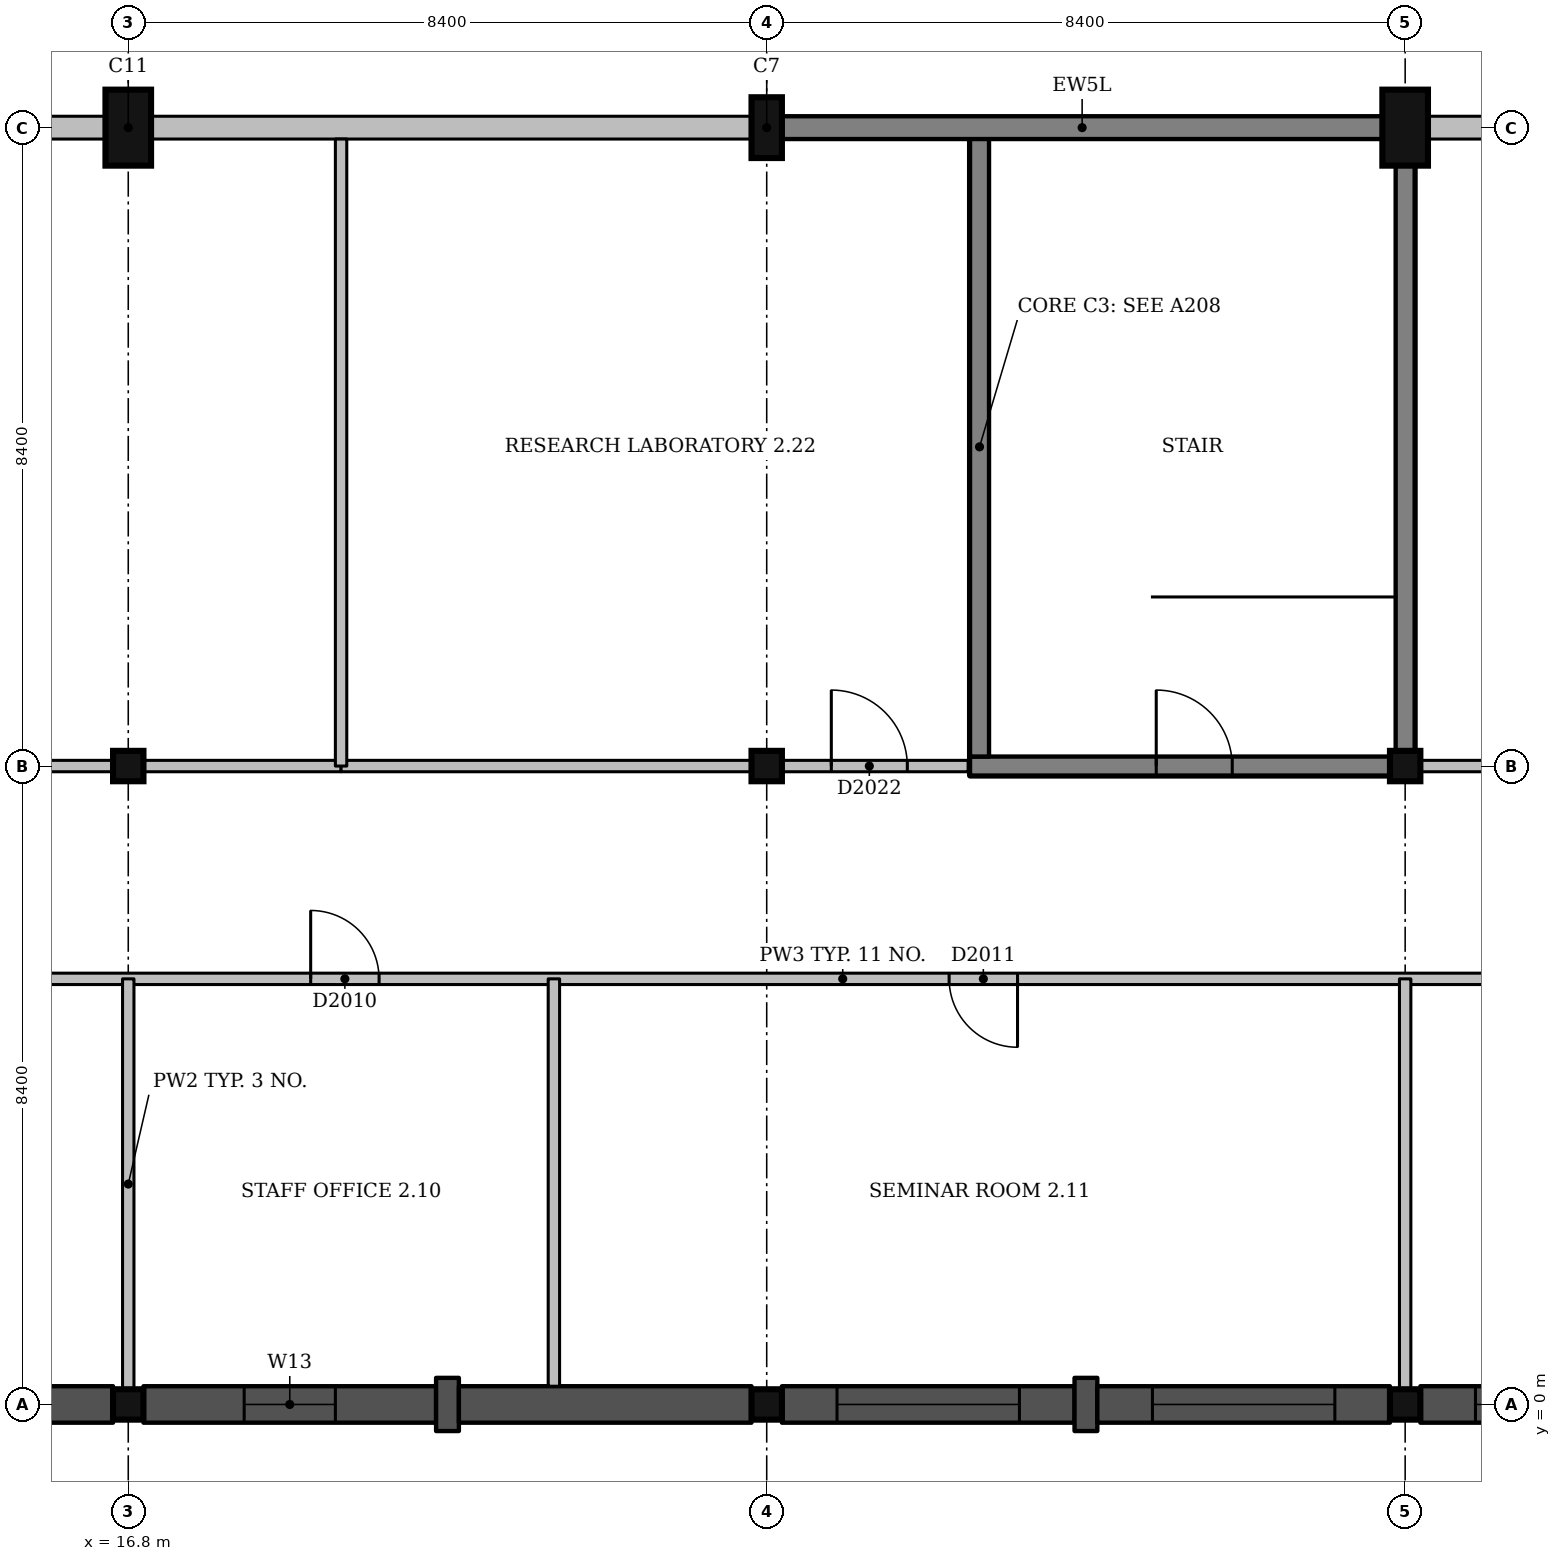
"""IFC4 building model, lengths in metres.
Left out: names, types, materials, properties, quantities, classifications, styles, units other than length and angle.
Written with IfcOpenShell. Run it as: python <this file> out.ifc"""

import sys

from ifc_helpers import new_model, si_unit, direction, frame, frame_2d, origin, origin_2d, place, context, subcontext, project, spatial, rectangle, extrude, element, fill, save


model = new_model("IFC4")
c1 = context("Model", 3, precision=1e-05, world=origin(), true_north=direction((0.0, 1.0)))
c2 = subcontext(c1, "Body", "Model", "MODEL_VIEW")
j1 = project(units=[si_unit("LENGTHUNIT", "METRE"), si_unit("PLANEANGLEUNIT", "RADIAN")], contexts=[c1])
p1 = place(None, origin())
s1 = spatial("IfcSite", under=j1, at=p1, CompositionType="ELEMENT")
p2 = place(p1, origin())
s2 = spatial("IfcBuilding", under=s1, at=p2, CompositionType="ELEMENT")
p3 = place(p2, frame((0.0, 0.0, 9.0)))
s3 = spatial("IfcBuildingStorey", under=s2, at=p3, CompositionType="ELEMENT", Elevation=9.0)
for number, where, z_axis, x_axis in (
    (1, (16.8, 0.0, 0.0), (0.0, 0.0, 1.0), (1.0, 0.0, 0.0)),
    (2, (16.8, 8.4, 0.0), (0.0, 0.0, 1.0), (1.0, 0.0, 0.0)),
):
    element("IfcColumn", number, at=place(p3, frame(where, z_axis=z_axis, x_axis=x_axis)), inside=s3, PredefinedType="COLUMN", context=c2, shape_type="SweptSolid", body=[
        extrude(rectangle(XDim=0.4, YDim=0.4, at=origin_2d()), origin(), (0.0, 0.0, 1.0), 4.5),
    ])
p4 = place(p3, frame((16.8, 16.8, 0.0), z_axis=(0.0, 0.0, 1.0), x_axis=(1.0, 0.0, 0.0)))
e3 = element("IfcColumn", 3, at=p4, inside=s3, PredefinedType="COLUMN", context=c2, shape_type="SweptSolid", body=[
    extrude(rectangle(XDim=0.6, YDim=1.0, at=origin_2d()), origin(), (0.0, 0.0, 1.0), 4.5),
])
for number, where, z_axis, x_axis in (
    (4, (25.2, 0.0, 0.0), (0.0, 0.0, 1.0), (1.0, 0.0, 0.0)),
    (5, (25.2, 8.4, 0.0), (0.0, 0.0, 1.0), (1.0, 0.0, 0.0)),
):
    element("IfcColumn", number, at=place(p3, frame(where, z_axis=z_axis, x_axis=x_axis)), inside=s3, PredefinedType="COLUMN", context=c2, shape_type="SweptSolid", body=[
        extrude(rectangle(XDim=0.4, YDim=0.4, at=origin_2d()), origin(), (0.0, 0.0, 1.0), 4.5),
    ])
p5 = place(p3, frame((25.2, 16.8, 0.0), z_axis=(0.0, 0.0, 1.0), x_axis=(1.0, 0.0, 0.0)))
e6 = element("IfcColumn", 6, at=p5, inside=s3, PredefinedType="COLUMN", context=c2, shape_type="SweptSolid", body=[
    extrude(rectangle(XDim=0.4, YDim=0.8, at=origin_2d()), origin(), (0.0, 0.0, 1.0), 4.5),
])
for number, where, z_axis, x_axis in (
    (7, (33.6, 0.0, 0.0), (0.0, 0.0, 1.0), (1.0, 0.0, 0.0)),
    (8, (33.6, 8.4, 0.0), (0.0, 0.0, 1.0), (1.0, 0.0, 0.0)),
):
    element("IfcColumn", number, at=place(p3, frame(where, z_axis=z_axis, x_axis=x_axis)), inside=s3, PredefinedType="COLUMN", context=c2, shape_type="SweptSolid", body=[
        extrude(rectangle(XDim=0.4, YDim=0.4, at=origin_2d()), origin(), (0.0, 0.0, 1.0), 4.5),
    ])
p6 = place(p3, frame((33.6, 16.8, 0.0), z_axis=(0.0, 0.0, 1.0), x_axis=(1.0, 0.0, 0.0)))
e9 = element("IfcColumn", 9, at=p6, inside=s3, PredefinedType="COLUMN", context=c2, shape_type="SweptSolid", body=[
    extrude(rectangle(XDim=0.6, YDim=1.0, at=origin_2d()), origin(), (0.0, 0.0, 1.0), 4.5),
])
p7 = place(p3, frame((27.875, 8.4, 0.0), z_axis=(0.0, 0.0, 1.0), x_axis=(1.0, 0.0, 0.0)))
e10 = element("IfcWall", 10, at=p7, inside=s3, PredefinedType="SHEAR", context=c2, shape_type="SweptSolid", body=[
    extrude(rectangle(XDim=5.525, YDim=0.25, at=frame_2d((2.762, 0.0))), origin(), (0.0, 0.0, 1.0), 4.2),
])
p8 = place(p7, frame((2.45, 0.0, 0.0)))
e11 = element("IfcOpeningElement", 11, at=p8, cuts=e10, PredefinedType="OPENING", context=c2, shape_type="SweptSolid", body=[
    extrude(rectangle(XDim=1.0, YDim=2.1, at=frame_2d((0.5, 1.05))), frame((0.0, 0.135, 0.0), z_axis=(0.0, -1.0, 0.0), x_axis=(1.0, 0.0, 0.0)), (0.0, 0.0, 1.0), 0.27),
])
p9 = place(p3, frame((28.0, 8.525, 0.0), z_axis=(0.0, 0.0, 1.0), x_axis=(0.0, 1.0, 0.0)))
e12 = element("IfcWall", 12, at=p9, inside=s3, PredefinedType="SHEAR", context=c2, shape_type="SweptSolid", body=[
    extrude(rectangle(XDim=8.15, YDim=0.25, at=frame_2d((4.075, 0.0))), origin(), (0.0, 0.0, 1.0), 4.2),
])
p10 = place(p3, frame((33.6, 8.6, 0.0), z_axis=(0.0, 0.0, 1.0), x_axis=(0.0, 1.0, 0.0)))
e13 = element("IfcWall", 13, at=p10, inside=s3, PredefinedType="SHEAR", context=c2, shape_type="SweptSolid", body=[
    extrude(rectangle(XDim=7.7, YDim=0.25, at=frame_2d((3.85, 0.0))), origin(), (0.0, 0.0, 1.0), 4.2),
])
for number, where, z_axis, x_axis in (
    (14, (41.8, 16.8, 0.0), (0.0, 0.0, 1.0), (-1.0, 0.0, 0.0)),
    (15, (33.3, 16.8, 0.0), (0.0, 0.0, 1.0), (-1.0, 0.0, 0.0)),
):
    element("IfcWall", number, at=place(p3, frame(where, z_axis=z_axis, x_axis=x_axis)), inside=s3, PredefinedType="SOLIDWALL", context=c2, shape_type="SweptSolid", body=[
        extrude(rectangle(XDim=7.9, YDim=0.3, at=frame_2d((3.95, 0.0))), origin(), (0.0, 0.0, 1.0), 3.6),
    ])
for number, where, z_axis, x_axis in (
    (16, (25.0, 16.8, 0.0), (0.0, 0.0, 1.0), (-1.0, 0.0, 0.0)),
    (17, (16.5, 16.8, 0.0), (0.0, 0.0, 1.0), (-1.0, 0.0, 0.0)),
):
    element("IfcWall", number, at=place(p3, frame(where, z_axis=z_axis, x_axis=x_axis)), inside=s3, PredefinedType="SOLIDWALL", context=c2, shape_type="SweptSolid", body=[
        extrude(rectangle(XDim=7.9, YDim=0.3, at=frame_2d((3.95, 0.0))), origin(), (0.0, 0.0, 1.0), 3.6),
    ])
p11 = place(p3, frame((12.75, 0.0, 0.0), z_axis=(0.0, 0.0, 1.0), x_axis=(1.0, 0.0, 0.0)))
e18 = element("IfcWall", 18, at=p11, inside=s3, PredefinedType="SOLIDWALL", context=c2, shape_type="SweptSolid", body=[
    extrude(rectangle(XDim=3.85, YDim=0.48, at=frame_2d((1.925, 0.0))), origin(), (0.0, 0.0, 1.0), 3.6),
])
p12 = place(p11, frame((1.325, 0.0, 0.9)))
e19 = element("IfcOpeningElement", 19, at=p12, cuts=e18, PredefinedType="OPENING", context=c2, shape_type="SweptSolid", body=[
    extrude(rectangle(XDim=1.2, YDim=2.1, at=frame_2d((0.6, 1.05))), frame((0.0, 0.25, 0.0), z_axis=(0.0, -1.0, 0.0), x_axis=(1.0, 0.0, 0.0)), (0.0, 0.0, 1.0), 0.5),
])
p13 = place(p3, frame((17.0, 0.0, 0.0), z_axis=(0.0, 0.0, 1.0), x_axis=(1.0, 0.0, 0.0)))
e20 = element("IfcWall", 20, at=p13, inside=s3, PredefinedType="SOLIDWALL", context=c2, shape_type="SweptSolid", body=[
    extrude(rectangle(XDim=3.85, YDim=0.48, at=frame_2d((1.925, 0.0))), origin(), (0.0, 0.0, 1.0), 3.6),
])
p14 = place(p13, frame((1.325, 0.0, 0.9)))
e21 = element("IfcOpeningElement", 21, at=p14, cuts=e20, PredefinedType="OPENING", context=c2, shape_type="SweptSolid", body=[
    extrude(rectangle(XDim=1.2, YDim=2.1, at=frame_2d((0.6, 1.05))), frame((0.0, 0.25, 0.0), z_axis=(0.0, -1.0, 0.0), x_axis=(1.0, 0.0, 0.0)), (0.0, 0.0, 1.0), 0.5),
])
p15 = place(p3, frame((20.85, 0.0, 0.0), z_axis=(0.0, 0.0, 1.0), x_axis=(1.0, 0.0, 0.0)))
e22 = element("IfcWall", 22, at=p15, inside=s3, PredefinedType="SOLIDWALL", context=c2, shape_type="SweptSolid", body=[
    extrude(rectangle(XDim=0.3, YDim=0.7, at=frame_2d((0.15, 0.0))), origin(), (0.0, 0.0, 1.0), 3.6),
])
p16 = place(p3, frame((21.15, 0.0, 0.0), z_axis=(0.0, 0.0, 1.0), x_axis=(1.0, 0.0, 0.0)))
e23 = element("IfcWall", 23, at=p16, inside=s3, PredefinedType="SOLIDWALL", context=c2, shape_type="SweptSolid", body=[
    extrude(rectangle(XDim=3.85, YDim=0.48, at=frame_2d((1.925, 0.0))), origin(), (0.0, 0.0, 1.0), 3.6),
])
p17 = place(p3, frame((25.4, 0.0, 0.0), z_axis=(0.0, 0.0, 1.0), x_axis=(1.0, 0.0, 0.0)))
e24 = element("IfcWall", 24, at=p17, inside=s3, PredefinedType="SOLIDWALL", context=c2, shape_type="SweptSolid", body=[
    extrude(rectangle(XDim=3.85, YDim=0.48, at=frame_2d((1.925, 0.0))), origin(), (0.0, 0.0, 1.0), 3.6),
])
p18 = place(p17, frame((0.725, 0.0, 2.4)))
e25 = element("IfcOpeningElement", 25, at=p18, cuts=e24, PredefinedType="OPENING", context=c2, shape_type="SweptSolid", body=[
    extrude(rectangle(XDim=2.4, YDim=0.6, at=frame_2d((1.2, 0.3))), frame((0.0, 0.25, 0.0), z_axis=(0.0, -1.0, 0.0), x_axis=(1.0, 0.0, 0.0)), (0.0, 0.0, 1.0), 0.5),
])
p19 = place(p3, frame((29.25, 0.0, 0.0), z_axis=(0.0, 0.0, 1.0), x_axis=(1.0, 0.0, 0.0)))
e26 = element("IfcWall", 26, at=p19, inside=s3, PredefinedType="SOLIDWALL", context=c2, shape_type="SweptSolid", body=[
    extrude(rectangle(XDim=0.3, YDim=0.7, at=frame_2d((0.15, 0.0))), origin(), (0.0, 0.0, 1.0), 3.6),
])
p20 = place(p3, frame((29.55, 0.0, 0.0), z_axis=(0.0, 0.0, 1.0), x_axis=(1.0, 0.0, 0.0)))
e27 = element("IfcWall", 27, at=p20, inside=s3, PredefinedType="SOLIDWALL", context=c2, shape_type="SweptSolid", body=[
    extrude(rectangle(XDim=3.85, YDim=0.48, at=frame_2d((1.925, 0.0))), origin(), (0.0, 0.0, 1.0), 3.6),
])
p21 = place(p20, frame((0.725, 0.0, 2.4)))
e28 = element("IfcOpeningElement", 28, at=p21, cuts=e27, PredefinedType="OPENING", context=c2, shape_type="SweptSolid", body=[
    extrude(rectangle(XDim=2.4, YDim=0.6, at=frame_2d((1.2, 0.3))), frame((0.0, 0.25, 0.0), z_axis=(0.0, -1.0, 0.0), x_axis=(1.0, 0.0, 0.0)), (0.0, 0.0, 1.0), 0.5),
])
p22 = place(p3, frame((33.8, 0.0, 0.0), z_axis=(0.0, 0.0, 1.0), x_axis=(1.0, 0.0, 0.0)))
e29 = element("IfcWall", 29, at=p22, inside=s3, PredefinedType="SOLIDWALL", context=c2, shape_type="SweptSolid", body=[
    extrude(rectangle(XDim=3.85, YDim=0.48, at=frame_2d((1.925, 0.0))), origin(), (0.0, 0.0, 1.0), 3.6),
])
p23 = place(p22, frame((0.725, 0.0, 2.4)))
e30 = element("IfcOpeningElement", 30, at=p23, cuts=e29, PredefinedType="OPENING", context=c2, shape_type="SweptSolid", body=[
    extrude(rectangle(XDim=2.4, YDim=0.6, at=frame_2d((1.2, 0.3))), frame((0.0, 0.25, 0.0), z_axis=(0.0, -1.0, 0.0), x_axis=(1.0, 0.0, 0.0)), (0.0, 0.0, 1.0), 0.5),
])
p24 = place(p3, frame((11.2, 5.6, 0.0), z_axis=(0.0, 0.0, 1.0), x_axis=(1.0, 0.0, 0.0)))
e31 = element("IfcWall", 31, at=p24, inside=s3, PredefinedType="PARTITIONING", context=c2, shape_type="SweptSolid", body=[
    extrude(rectangle(XDim=30.0, YDim=0.15, at=frame_2d((15.0, 0.0))), origin(), (0.0, 0.0, 1.0), 3.6),
])
p25 = place(p24, frame((2.4, 0.0, 0.0)))
e32 = element("IfcOpeningElement", 32, at=p25, cuts=e31, PredefinedType="OPENING", context=c2, shape_type="SweptSolid", body=[
    extrude(rectangle(XDim=0.9, YDim=2.1, at=frame_2d((0.45, 1.05))), frame((0.0, 0.085, 0.0), z_axis=(0.0, -1.0, 0.0), x_axis=(1.0, 0.0, 0.0)), (0.0, 0.0, 1.0), 0.17),
])
p26 = place(p24, frame((8.0, 0.0, 0.0)))
e33 = element("IfcOpeningElement", 33, at=p26, cuts=e31, PredefinedType="OPENING", context=c2, shape_type="SweptSolid", body=[
    extrude(rectangle(XDim=0.9, YDim=2.1, at=frame_2d((0.45, 1.05))), frame((0.0, 0.085, 0.0), z_axis=(0.0, -1.0, 0.0), x_axis=(1.0, 0.0, 0.0)), (0.0, 0.0, 1.0), 0.17),
])
p27 = place(p24, frame((16.4, 0.0, 0.0)))
e34 = element("IfcOpeningElement", 34, at=p27, cuts=e31, PredefinedType="OPENING", context=c2, shape_type="SweptSolid", body=[
    extrude(rectangle(XDim=0.9, YDim=2.1, at=frame_2d((0.45, 1.05))), frame((0.0, 0.085, 0.0), z_axis=(0.0, -1.0, 0.0), x_axis=(1.0, 0.0, 0.0)), (0.0, 0.0, 1.0), 0.17),
])
p28 = place(p3, frame((8.6, 8.4, 0.0), z_axis=(0.0, 0.0, 1.0), x_axis=(1.0, 0.0, 0.0)))
e35 = element("IfcWall", 35, at=p28, inside=s3, PredefinedType="PARTITIONING", context=c2, shape_type="SweptSolid", body=[
    extrude(rectangle(XDim=8.0, YDim=0.15, at=frame_2d((4.0, 0.0))), origin(), (0.0, 0.0, 1.0), 3.6),
])
p29 = place(p28, frame((3.45, 0.0, 0.0)))
e36 = element("IfcOpeningElement", 36, at=p29, cuts=e35, PredefinedType="OPENING", context=c2, shape_type="SweptSolid", body=[
    extrude(rectangle(XDim=0.9, YDim=2.1, at=frame_2d((0.45, 1.05))), frame((0.0, 0.085, 0.0), z_axis=(0.0, -1.0, 0.0), x_axis=(1.0, 0.0, 0.0)), (0.0, 0.0, 1.0), 0.17),
])
p30 = place(p3, frame((17.0, 8.4, 0.0), z_axis=(0.0, 0.0, 1.0), x_axis=(1.0, 0.0, 0.0)))
e37 = element("IfcWall", 37, at=p30, inside=s3, PredefinedType="PARTITIONING", context=c2, shape_type="SweptSolid", body=[
    extrude(rectangle(XDim=2.6, YDim=0.15, at=frame_2d((1.3, 0.0))), origin(), (0.0, 0.0, 1.0), 3.6),
])
p31 = place(p3, frame((33.8, 8.4, 0.0), z_axis=(0.0, 0.0, 1.0), x_axis=(1.0, 0.0, 0.0)))
e38 = element("IfcWall", 38, at=p31, inside=s3, PredefinedType="PARTITIONING", context=c2, shape_type="SweptSolid", body=[
    extrude(rectangle(XDim=8.0, YDim=0.15, at=frame_2d((4.0, 0.0))), origin(), (0.0, 0.0, 1.0), 3.6),
])
p32 = place(p31, frame((3.1, 0.0, 0.0)))
e39 = element("IfcOpeningElement", 39, at=p32, cuts=e38, PredefinedType="OPENING", context=c2, shape_type="SweptSolid", body=[
    extrude(rectangle(XDim=1.8, YDim=2.1, at=frame_2d((0.9, 1.05))), frame((0.0, 0.085, 0.0), z_axis=(0.0, -1.0, 0.0), x_axis=(1.0, 0.0, 0.0)), (0.0, 0.0, 1.0), 0.17),
])
p33 = place(p3, frame((19.6, 8.4, 0.0), z_axis=(0.0, 0.0, 1.0), x_axis=(1.0, 0.0, 0.0)))
e40 = element("IfcWall", 40, at=p33, inside=s3, PredefinedType="PARTITIONING", context=c2, shape_type="SweptSolid", body=[
    extrude(rectangle(XDim=5.4, YDim=0.15, at=frame_2d((2.7, 0.0))), origin(), (0.0, 0.0, 1.0), 3.6),
])
p34 = place(p3, frame((25.4, 8.4, 0.0), z_axis=(0.0, 0.0, 1.0), x_axis=(1.0, 0.0, 0.0)))
e41 = element("IfcWall", 41, at=p34, inside=s3, PredefinedType="PARTITIONING", context=c2, shape_type="SweptSolid", body=[
    extrude(rectangle(XDim=2.45, YDim=0.15, at=frame_2d((1.225, 0.0))), origin(), (0.0, 0.0, 1.0), 3.6),
])
p35 = place(p34, frame((0.65, 0.0, 0.0)))
e42 = element("IfcOpeningElement", 42, at=p35, cuts=e41, PredefinedType="OPENING", context=c2, shape_type="SweptSolid", body=[
    extrude(rectangle(XDim=1.0, YDim=2.1, at=frame_2d((0.5, 1.05))), frame((0.0, 0.085, 0.0), z_axis=(0.0, -1.0, 0.0), x_axis=(1.0, 0.0, 0.0)), (0.0, 0.0, 1.0), 0.17),
])
p36 = place(p3, frame((16.8, 0.2, 0.0), z_axis=(0.0, 0.0, 1.0), x_axis=(0.0, 1.0, 0.0)))
e43 = element("IfcWall", 43, at=p36, inside=s3, PredefinedType="PARTITIONING", context=c2, shape_type="SweptSolid", body=[
    extrude(rectangle(XDim=5.4, YDim=0.15, at=frame_2d((2.7, 0.0))), origin(), (0.0, 0.0, 1.0), 3.6),
])
p37 = place(p3, frame((19.6, 8.4, 0.0), z_axis=(0.0, 0.0, 1.0), x_axis=(0.0, 1.0, 0.0)))
e44 = element("IfcWall", 44, at=p37, inside=s3, PredefinedType="PARTITIONING", context=c2, shape_type="SweptSolid", body=[
    extrude(rectangle(XDim=8.25, YDim=0.15, at=frame_2d((4.125, 0.0))), origin(), (0.0, 0.0, 1.0), 3.6),
])
p38 = place(p3, frame((22.4, 0.24, 0.0), z_axis=(0.0, 0.0, 1.0), x_axis=(0.0, 1.0, 0.0)))
e45 = element("IfcWall", 45, at=p38, inside=s3, PredefinedType="PARTITIONING", context=c2, shape_type="SweptSolid", body=[
    extrude(rectangle(XDim=5.36, YDim=0.15, at=frame_2d((2.68, 0.0))), origin(), (0.0, 0.0, 1.0), 4.15),
])
p39 = place(p3, frame((33.6, 0.2, 0.0), z_axis=(0.0, 0.0, 1.0), x_axis=(0.0, 1.0, 0.0)))
e46 = element("IfcWall", 46, at=p39, inside=s3, PredefinedType="PARTITIONING", context=c2, shape_type="SweptSolid", body=[
    extrude(rectangle(XDim=5.4, YDim=0.15, at=frame_2d((2.7, 0.0))), origin(), (0.0, 0.0, 1.0), 3.6),
])
p40 = place(p14, origin())
e47 = element("IfcWindow", 47, at=p40, inside=s3, PartitioningType="SINGLE_PANEL", PredefinedType="WINDOW", context=c2, shape_type="SweptSolid", body=[
    extrude(rectangle(XDim=1.2, YDim=2.1, at=frame_2d((0.6, 1.05))), frame((0.0, 0.12, 0.0), z_axis=(0.0, -1.0, 0.0), x_axis=(1.0, 0.0, 0.0)), (0.0, 0.0, 1.0), 0.06),
])
fill(e21, e47)
p41 = place(p18, origin())
e48 = element("IfcWindow", 48, at=p41, inside=s3, PartitioningType="SINGLE_PANEL", PredefinedType="WINDOW", context=c2, shape_type="SweptSolid", body=[
    extrude(rectangle(XDim=2.4, YDim=0.6, at=frame_2d((1.2, 0.3))), frame((0.0, 0.12, 0.0), z_axis=(0.0, -1.0, 0.0), x_axis=(1.0, 0.0, 0.0)), (0.0, 0.0, 1.0), 0.06),
])
fill(e25, e48)
p42 = place(p21, origin())
e49 = element("IfcWindow", 49, at=p42, inside=s3, PartitioningType="SINGLE_PANEL", PredefinedType="WINDOW", context=c2, shape_type="SweptSolid", body=[
    extrude(rectangle(XDim=2.4, YDim=0.6, at=frame_2d((1.2, 0.3))), frame((0.0, 0.12, 0.0), z_axis=(0.0, -1.0, 0.0), x_axis=(1.0, 0.0, 0.0)), (0.0, 0.0, 1.0), 0.06),
])
fill(e28, e49)
p43 = place(p23, origin())
e50 = element("IfcWindow", 50, at=p43, inside=s3, PartitioningType="SINGLE_PANEL", PredefinedType="WINDOW", context=c2, shape_type="SweptSolid", body=[
    extrude(rectangle(XDim=2.4, YDim=0.6, at=frame_2d((1.2, 0.3))), frame((0.0, 0.12, 0.0), z_axis=(0.0, -1.0, 0.0), x_axis=(1.0, 0.0, 0.0)), (0.0, 0.0, 1.0), 0.06),
])
fill(e30, e50)
p44 = place(p26, origin())
e51 = element("IfcDoor", 51, at=p44, inside=s3, OperationType="SINGLE_SWING_LEFT", PredefinedType="DOOR", context=c2, shape_type="SweptSolid", body=[
    extrude(rectangle(XDim=0.9, YDim=2.1, at=frame_2d((0.45, 1.05))), frame((0.0, 0.025, 0.0), z_axis=(0.0, -1.0, 0.0), x_axis=(1.0, 0.0, 0.0)), (0.0, 0.0, 1.0), 0.05),
])
fill(e33, e51)
p45 = place(p27, origin())
e52 = element("IfcDoor", 52, at=p45, inside=s3, OperationType="SINGLE_SWING_RIGHT", PredefinedType="DOOR", context=c2, shape_type="SweptSolid", body=[
    extrude(rectangle(XDim=0.9, YDim=2.1, at=frame_2d((0.45, 1.05))), frame((0.0, 0.025, 0.0), z_axis=(0.0, -1.0, 0.0), x_axis=(1.0, 0.0, 0.0)), (0.0, 0.0, 1.0), 0.05),
])
fill(e34, e52)
p46 = place(p35, origin())
e53 = element("IfcDoor", 53, at=p46, inside=s3, OperationType="SINGLE_SWING_LEFT", PredefinedType="DOOR", context=c2, shape_type="SweptSolid", body=[
    extrude(rectangle(XDim=1.0, YDim=2.1, at=frame_2d((0.5, 1.05))), frame((0.0, 0.025, 0.0), z_axis=(0.0, -1.0, 0.0), x_axis=(1.0, 0.0, 0.0)), (0.0, 0.0, 1.0), 0.05),
])
fill(e42, e53)
p47 = place(p8, origin())
e54 = element("IfcDoor", 54, at=p47, inside=s3, OperationType="SINGLE_SWING_LEFT", PredefinedType="DOOR", context=c2, shape_type="SweptSolid", body=[
    extrude(rectangle(XDim=1.0, YDim=2.1, at=frame_2d((0.5, 1.05))), frame((0.0, 0.025, 0.0), z_axis=(0.0, -1.0, 0.0), x_axis=(1.0, 0.0, 0.0)), (0.0, 0.0, 1.0), 0.05),
])
fill(e11, e54)
save(model, sys.argv[1])
